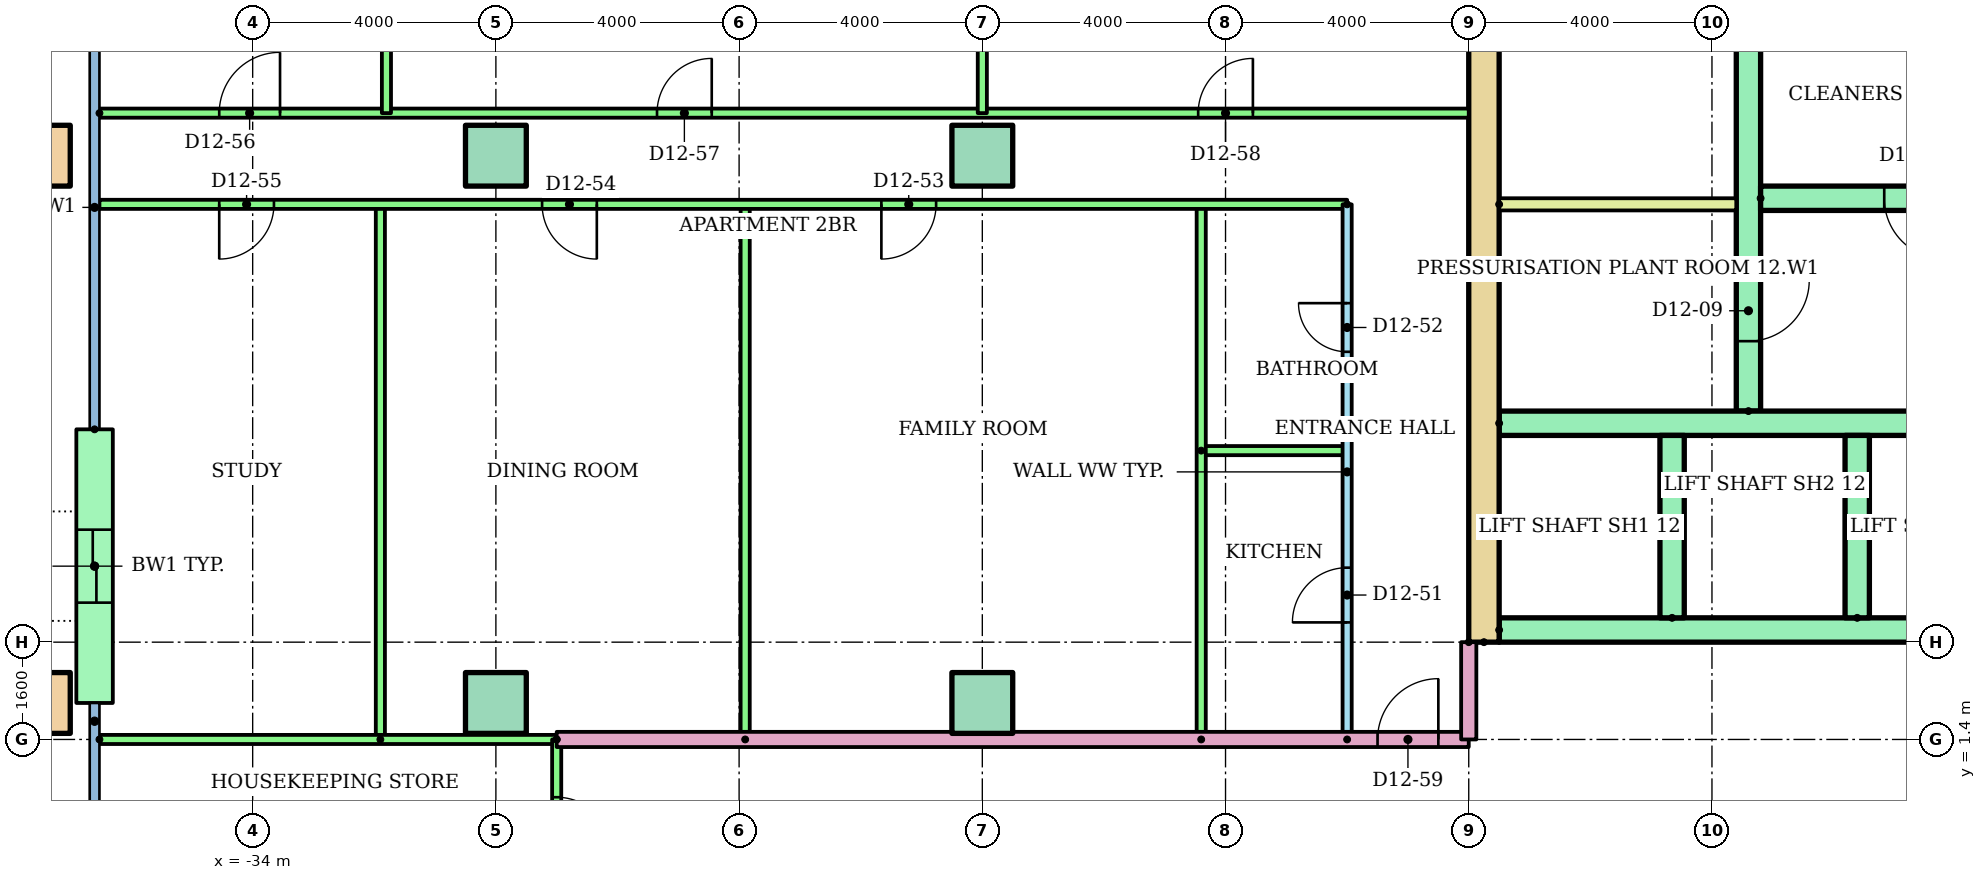
"""IFC4 building model, lengths in metres.
Left out: names, types, materials, properties, quantities, classifications, styles, units other than length and angle.
Written with IfcOpenShell. Run it as: python <this file> out.ifc"""

import sys

from ifc_helpers import new_model, si_unit, direction, frame, frame_2d, origin, origin_2d, place, context, subcontext, project, spatial, rectangle, hollow_rectangle, extrude, element, fill, save


model = new_model("IFC4")
c1 = context("Model", 3, precision=1e-05, world=origin(), true_north=direction((0.0, 1.0)))
c2 = subcontext(c1, "Body", "Model", "MODEL_VIEW")
j1 = project(units=[si_unit("LENGTHUNIT", "METRE"), si_unit("PLANEANGLEUNIT", "RADIAN")], contexts=[c1])
p1 = place(None, origin())
s1 = spatial("IfcSite", under=j1, at=p1, CompositionType="ELEMENT")
p2 = place(p1, origin())
s2 = spatial("IfcBuilding", under=s1, at=p2, CompositionType="ELEMENT")
p3 = place(p2, frame((0.0, 0.0, 48.0)))
s3 = spatial("IfcBuildingStorey", under=s2, at=p3, CompositionType="ELEMENT", Elevation=48.0)
p4 = place(p3, frame((-37.5, 2.0, 0.0)))
e1 = element("IfcColumn", 1, at=p4, inside=s3, PredefinedType="COLUMN", context=c2, shape_type="SweptSolid", body=[
    extrude(hollow_rectangle(XDim=1.0, YDim=1.0, WallThickness=0.05, at=origin_2d()), origin(), (0.0, 0.0, 1.0), 3.2),
])
for number, where in (
    (2, (-30.0, 2.0, 0.0)),
    (3, (-22.0, 2.0, 0.0)),
):
    element("IfcColumn", number, at=place(p3, frame(where)), inside=s3, PredefinedType="COLUMN", context=c2, shape_type="SweptSolid", body=[
        extrude(rectangle(XDim=1.0, YDim=1.0, at=origin_2d()), origin(), (0.0, 0.0, 1.0), 3.2),
    ])
p5 = place(p3, frame((-37.5, 11.0, 0.0)))
e4 = element("IfcColumn", 4, at=p5, inside=s3, PredefinedType="COLUMN", context=c2, shape_type="SweptSolid", body=[
    extrude(hollow_rectangle(XDim=1.0, YDim=1.0, WallThickness=0.05, at=origin_2d()), origin(), (0.0, 0.0, 1.0), 3.2),
])
for number, where in (
    (5, (-30.0, 11.0, 0.0)),
    (6, (-22.0, 11.0, 0.0)),
):
    element("IfcColumn", number, at=place(p3, frame(where)), inside=s3, PredefinedType="COLUMN", context=c2, shape_type="SweptSolid", body=[
        extrude(rectangle(XDim=1.0, YDim=1.0, at=origin_2d()), origin(), (0.0, 0.0, 1.0), 3.2),
    ])
p6 = place(p3, frame((-36.6, 6.5, 0.0), z_axis=(0.0, 0.0, 1.0), x_axis=(0.0, -1.0, 0.0)))
e7 = element("IfcWall", 7, at=p6, inside=s3, PredefinedType="STANDARD", context=c2, shape_type="SweptSolid", body=[
    extrude(rectangle(XDim=4.5, YDim=0.6, at=frame_2d((2.25, 0.0))), origin(), (0.0, 0.0, 1.0), 2.92),
])
p7 = place(p6, frame((1.65, 0.0, 0.0)))
e8 = element("IfcOpeningElement", 8, at=p7, cuts=e7, PredefinedType="OPENING", context=c2, shape_type="SweptSolid", body=[
    extrude(rectangle(XDim=1.2, YDim=2.1, at=frame_2d((0.6, 1.05))), frame((0.0, 0.31, 0.0), z_axis=(0.0, -1.0, 0.0), x_axis=(1.0, 0.0, 0.0)), (0.0, 0.0, 1.0), 0.62),
])
p8 = place(p3, frame((-13.75, 3.0, 0.0), z_axis=(0.0, 0.0, 1.0), x_axis=(0.0, 1.0, 0.0)))
e9 = element("IfcWall", 9, at=p8, inside=s3, PredefinedType="SHEAR", context=c2, shape_type="SweptSolid", body=[
    extrude(rectangle(XDim=17.0, YDim=0.5, at=frame_2d((8.5, 0.0))), origin(), (0.0, 0.0, 1.0), 2.92),
])
p9 = place(p3, frame((-9.4, 6.8, 0.0), z_axis=(0.0, 0.0, 1.0), x_axis=(0.0, 1.0, 0.0)))
e10 = element("IfcWall", 10, at=p9, inside=s3, PredefinedType="SHEAR", context=c2, shape_type="SweptSolid", body=[
    extrude(rectangle(XDim=12.7, YDim=0.4, at=frame_2d((6.35, 0.0))), origin(), (0.0, 0.0, 1.0), 2.92),
])
p10 = place(p9, frame((1.15, 0.0, 0.0)))
e11 = element("IfcOpeningElement", 11, at=p10, cuts=e10, PredefinedType="OPENING", context=c2, shape_type="SweptSolid", body=[
    extrude(rectangle(XDim=1.0, YDim=2.1, at=frame_2d((0.5, 1.05))), frame((0.0, 0.21, 0.0), z_axis=(0.0, -1.0, 0.0), x_axis=(1.0, 0.0, 0.0)), (0.0, 0.0, 1.0), 0.42),
])
p11 = place(p9, frame((7.925, 0.0, 0.0)))
e12 = element("IfcOpeningElement", 12, at=p11, cuts=e10, PredefinedType="OPENING", context=c2, shape_type="SweptSolid", body=[
    extrude(rectangle(XDim=1.0, YDim=2.1, at=frame_2d((0.5, 1.05))), frame((0.0, 0.21, 0.0), z_axis=(0.0, -1.0, 0.0), x_axis=(1.0, 0.0, 0.0)), (0.0, 0.0, 1.0), 0.42),
])
p12 = place(p3, frame((-13.5, 3.2, 0.0)))
e13 = element("IfcWall", 13, at=p12, inside=s3, PredefinedType="SHEAR", context=c2, shape_type="SweptSolid", body=[
    extrude(rectangle(XDim=27.0, YDim=0.4, at=frame_2d((13.5, 0.0))), origin(), (0.0, 0.0, 1.0), 2.92),
])
p13 = place(p12, frame((6.861, 0.0, 0.0)))
e14 = element("IfcOpeningElement", 14, at=p13, cuts=e13, PredefinedType="OPENING", context=c2, shape_type="SweptSolid", body=[
    extrude(rectangle(XDim=1.1, YDim=2.1, at=frame_2d((0.55, 1.05))), frame((0.0, 0.21, 0.0), z_axis=(0.0, -1.0, 0.0), x_axis=(1.0, 0.0, 0.0)), (0.0, 0.0, 1.0), 0.42),
])
p14 = place(p12, frame((9.906, 0.0, 0.0)))
e15 = element("IfcOpeningElement", 15, at=p14, cuts=e13, PredefinedType="OPENING", context=c2, shape_type="SweptSolid", body=[
    extrude(rectangle(XDim=1.1, YDim=2.1, at=frame_2d((0.55, 1.05))), frame((0.0, 0.21, 0.0), z_axis=(0.0, -1.0, 0.0), x_axis=(1.0, 0.0, 0.0)), (0.0, 0.0, 1.0), 0.42),
])
p15 = place(p12, frame((15.994, 0.0, 0.0)))
e16 = element("IfcOpeningElement", 16, at=p15, cuts=e13, PredefinedType="OPENING", context=c2, shape_type="SweptSolid", body=[
    extrude(rectangle(XDim=1.1, YDim=2.1, at=frame_2d((0.55, 1.05))), frame((0.0, 0.21, 0.0), z_axis=(0.0, -1.0, 0.0), x_axis=(1.0, 0.0, 0.0)), (0.0, 0.0, 1.0), 0.42),
])
p16 = place(p12, frame((19.039, 0.0, 0.0)))
e17 = element("IfcOpeningElement", 17, at=p16, cuts=e13, PredefinedType="OPENING", context=c2, shape_type="SweptSolid", body=[
    extrude(rectangle(XDim=1.1, YDim=2.1, at=frame_2d((0.55, 1.05))), frame((0.0, 0.21, 0.0), z_axis=(0.0, -1.0, 0.0), x_axis=(1.0, 0.0, 0.0)), (0.0, 0.0, 1.0), 0.42),
])
p17 = place(p12, frame((12.6, 0.0, 0.0)))
e18 = element("IfcOpeningElement", 18, at=p17, cuts=e13, PredefinedType="OPENING", context=c2, shape_type="SweptSolid", body=[
    extrude(rectangle(XDim=1.8, YDim=2.1, at=frame_2d((0.9, 1.05))), frame((0.0, 0.21, 0.0), z_axis=(0.0, -1.0, 0.0), x_axis=(1.0, 0.0, 0.0)), (0.0, 0.0, 1.0), 0.42),
])
p18 = place(p3, frame((-13.5, 6.6, 0.0)))
e19 = element("IfcWall", 19, at=p18, inside=s3, PredefinedType="SHEAR", context=c2, shape_type="SweptSolid", body=[
    extrude(rectangle(XDim=11.978, YDim=0.4, at=frame_2d((5.989, 0.0))), origin(), (0.0, 0.0, 1.0), 2.92),
])
for number, where, z_axis, x_axis in (
    (20, (-10.656, 3.4, 0.0), (0.0, 0.0, 1.0), (0.0, 1.0, 0.0)),
    (21, (-7.611, 3.4, 0.0), (0.0, 0.0, 1.0), (0.0, 1.0, 0.0)),
):
    element("IfcWall", number, at=place(p3, frame(where, z_axis=z_axis, x_axis=x_axis)), inside=s3, PredefinedType="SHEAR", context=c2, shape_type="SweptSolid", body=[
        extrude(rectangle(XDim=3.0, YDim=0.4, at=frame_2d((1.5, 0.0))), origin(), (0.0, 0.0, 1.0), 2.92),
    ])
p19 = place(p3, frame((-9.2, 10.3, 0.0)))
e22 = element("IfcWall", 22, at=p19, inside=s3, PredefinedType="SHEAR", context=c2, shape_type="SweptSolid", body=[
    extrude(rectangle(XDim=8.0, YDim=0.4, at=frame_2d((4.0, 0.0))), origin(), (0.0, 0.0, 1.0), 2.92),
])
p20 = place(p19, frame((2.033, 0.0, 0.0)))
e23 = element("IfcOpeningElement", 23, at=p20, cuts=e22, PredefinedType="OPENING", context=c2, shape_type="SweptSolid", body=[
    extrude(rectangle(XDim=1.0, YDim=2.1, at=frame_2d((0.5, 1.05))), frame((0.0, 0.21, 0.0), z_axis=(0.0, -1.0, 0.0), x_axis=(1.0, 0.0, 0.0)), (0.0, 0.0, 1.0), 0.42),
])
p21 = place(p19, frame((6.133, 0.0, 0.0)))
e24 = element("IfcOpeningElement", 24, at=p21, cuts=e22, PredefinedType="OPENING", context=c2, shape_type="SweptSolid", body=[
    extrude(rectangle(XDim=1.0, YDim=2.1, at=frame_2d((0.5, 1.05))), frame((0.0, 0.21, 0.0), z_axis=(0.0, -1.0, 0.0), x_axis=(1.0, 0.0, 0.0)), (0.0, 0.0, 1.0), 0.42),
])
p22 = place(p3, frame((-13.5, 10.2, 0.0)))
e25 = element("IfcWall", 25, at=p22, inside=s3, PredefinedType="PARTITIONING", context=c2, shape_type="SweptSolid", body=[
    extrude(rectangle(XDim=3.9, YDim=0.2, at=frame_2d((1.95, 0.0))), origin(), (0.0, 0.0, 1.0), 2.92),
])
p23 = place(p3, frame((-16.0, 1.4, 0.0), z_axis=(0.0, 0.0, 1.0), x_axis=(0.0, 1.0, 0.0)))
e26 = element("IfcWall", 26, at=p23, inside=s3, PredefinedType="PARTITIONING", context=c2, shape_type="SweptSolid", body=[
    extrude(rectangle(XDim=8.8, YDim=0.15, at=frame_2d((4.4, 0.0))), origin(), (0.0, 0.0, 1.0), 2.4),
])
p24 = place(p23, frame((1.925, 0.0, 0.0)))
e27 = element("IfcOpeningElement", 27, at=p24, cuts=e26, PredefinedType="OPENING", context=c2, shape_type="SweptSolid", body=[
    extrude(rectangle(XDim=0.9, YDim=2.1, at=frame_2d((0.45, 1.05))), frame((0.0, 0.085, 0.0), z_axis=(0.0, -1.0, 0.0), x_axis=(1.0, 0.0, 0.0)), (0.0, 0.0, 1.0), 0.17),
])
p25 = place(p23, frame((6.375, 0.0, 0.0)))
e28 = element("IfcOpeningElement", 28, at=p25, cuts=e26, PredefinedType="OPENING", context=c2, shape_type="SweptSolid", body=[
    extrude(rectangle(XDim=0.8, YDim=2.1, at=frame_2d((0.4, 1.05))), frame((0.0, 0.085, 0.0), z_axis=(0.0, -1.0, 0.0), x_axis=(1.0, 0.0, 0.0)), (0.0, 0.0, 1.0), 0.17),
])
p26 = place(p3, frame((-18.4, 6.15, 0.0)))
e29 = element("IfcWall", 29, at=p26, inside=s3, PredefinedType="PARTITIONING", context=c2, shape_type="SweptSolid", body=[
    extrude(rectangle(XDim=2.4, YDim=0.15, at=frame_2d((1.2, 0.0))), origin(), (0.0, 0.0, 1.0), 2.4),
])
for number, where, z_axis, x_axis in (
    (30, (-18.4, 1.4, 0.0), (0.0, 0.0, 1.0), (0.0, 1.0, 0.0)),
    (31, (-25.9, 1.4, 0.0), (0.0, 0.0, 1.0), (0.0, 1.0, 0.0)),
    (32, (-31.9, 1.4, 0.0), (0.0, 0.0, 1.0), (0.0, 1.0, 0.0)),
):
    element("IfcWall", number, at=place(p3, frame(where, z_axis=z_axis, x_axis=x_axis)), inside=s3, PredefinedType="PARTITIONING", context=c2, shape_type="SweptSolid", body=[
        extrude(rectangle(XDim=8.8, YDim=0.15, at=frame_2d((4.4, 0.0))), origin(), (0.0, 0.0, 1.0), 2.4),
    ])
p27 = place(p3, frame((-16.0, 10.2, 0.0), z_axis=(0.0, 0.0, 1.0), x_axis=(-1.0, 0.0, 0.0)))
e33 = element("IfcWall", 33, at=p27, inside=s3, PredefinedType="PARTITIONING", context=c2, shape_type="SweptSolid", body=[
    extrude(rectangle(XDim=20.52, YDim=0.15, at=frame_2d((10.26, 0.0))), origin(), (0.0, 0.0, 1.0), 2.4),
])
p28 = place(p27, frame((6.76, 0.0, 0.0)))
e34 = element("IfcOpeningElement", 34, at=p28, cuts=e33, PredefinedType="OPENING", context=c2, shape_type="SweptSolid", body=[
    extrude(rectangle(XDim=0.9, YDim=2.1, at=frame_2d((0.45, 1.05))), frame((0.0, 0.085, 0.0), z_axis=(0.0, -1.0, 0.0), x_axis=(1.0, 0.0, 0.0)), (0.0, 0.0, 1.0), 0.17),
])
p29 = place(p27, frame((12.34, 0.0, 0.0)))
e35 = element("IfcOpeningElement", 35, at=p29, cuts=e33, PredefinedType="OPENING", context=c2, shape_type="SweptSolid", body=[
    extrude(rectangle(XDim=0.9, YDim=2.1, at=frame_2d((0.45, 1.05))), frame((0.0, 0.085, 0.0), z_axis=(0.0, -1.0, 0.0), x_axis=(1.0, 0.0, 0.0)), (0.0, 0.0, 1.0), 0.17),
])
p30 = place(p27, frame((17.65, 0.0, 0.0)))
e36 = element("IfcOpeningElement", 36, at=p30, cuts=e33, PredefinedType="OPENING", context=c2, shape_type="SweptSolid", body=[
    extrude(rectangle(XDim=0.9, YDim=2.1, at=frame_2d((0.45, 1.05))), frame((0.0, 0.085, 0.0), z_axis=(0.0, -1.0, 0.0), x_axis=(1.0, 0.0, 0.0)), (0.0, 0.0, 1.0), 0.17),
])
p31 = place(p3, frame((-36.52, 11.7, 0.0)))
e37 = element("IfcWall", 37, at=p31, inside=s3, PredefinedType="PARTITIONING", context=c2, shape_type="SweptSolid", body=[
    extrude(rectangle(XDim=22.52, YDim=0.15, at=frame_2d((11.26, 0.0))), origin(), (0.0, 0.0, 1.0), 2.4),
])
p32 = place(p31, frame((1.97, 0.0, 0.0)))
e38 = element("IfcOpeningElement", 38, at=p32, cuts=e37, PredefinedType="OPENING", context=c2, shape_type="SweptSolid", body=[
    extrude(rectangle(XDim=1.0, YDim=2.1, at=frame_2d((0.5, 1.05))), frame((0.0, 0.085, 0.0), z_axis=(0.0, -1.0, 0.0), x_axis=(1.0, 0.0, 0.0)), (0.0, 0.0, 1.0), 0.17),
])
p33 = place(p31, frame((9.17, 0.0, 0.0)))
e39 = element("IfcOpeningElement", 39, at=p33, cuts=e37, PredefinedType="OPENING", context=c2, shape_type="SweptSolid", body=[
    extrude(rectangle(XDim=0.9, YDim=2.1, at=frame_2d((0.45, 1.05))), frame((0.0, 0.085, 0.0), z_axis=(0.0, -1.0, 0.0), x_axis=(1.0, 0.0, 0.0)), (0.0, 0.0, 1.0), 0.17),
])
p34 = place(p31, frame((18.07, 0.0, 0.0)))
e40 = element("IfcOpeningElement", 40, at=p34, cuts=e37, PredefinedType="OPENING", context=c2, shape_type="SweptSolid", body=[
    extrude(rectangle(XDim=0.9, YDim=2.1, at=frame_2d((0.45, 1.05))), frame((0.0, 0.085, 0.0), z_axis=(0.0, -1.0, 0.0), x_axis=(1.0, 0.0, 0.0)), (0.0, 0.0, 1.0), 0.17),
])
p35 = place(p3, frame((-31.8, 16.72, 0.0), z_axis=(0.0, 0.0, 1.0), x_axis=(0.0, -1.0, 0.0)))
e41 = element("IfcWall", 41, at=p35, inside=s3, PredefinedType="PARTITIONING", context=c2, shape_type="SweptSolid", body=[
    extrude(rectangle(XDim=5.02, YDim=0.15, at=frame_2d((2.51, 0.0))), origin(), (0.0, 0.0, 1.0), 2.4),
])
p36 = place(p3, frame((-22.0, 18.521, 0.0), z_axis=(0.0, 0.0, 1.0), x_axis=(0.0, -1.0, 0.0)))
e42 = element("IfcWall", 42, at=p36, inside=s3, PredefinedType="PARTITIONING", context=c2, shape_type="SweptSolid", body=[
    extrude(rectangle(XDim=6.821, YDim=0.15, at=frame_2d((3.411, 0.0))), origin(), (0.0, 0.0, 1.0), 2.4),
])
p37 = place(p3, frame((-29.0, 1.4, 0.0)))
e43 = element("IfcWall", 43, at=p37, inside=s3, PredefinedType="PARTITIONING", context=c2, shape_type="SweptSolid", body=[
    extrude(rectangle(XDim=15.0, YDim=0.25, at=frame_2d((7.5, 0.0))), origin(), (0.0, 0.0, 1.0), 2.4),
])
p38 = place(p37, frame((13.5, 0.0, 0.0)))
e44 = element("IfcOpeningElement", 44, at=p38, cuts=e43, PredefinedType="OPENING", context=c2, shape_type="SweptSolid", body=[
    extrude(rectangle(XDim=1.0, YDim=2.1, at=frame_2d((0.5, 1.05))), frame((0.0, 0.135, 0.0), z_axis=(0.0, -1.0, 0.0), x_axis=(1.0, 0.0, 0.0)), (0.0, 0.0, 1.0), 0.27),
])
p39 = place(p3, frame((-36.52, 1.4, 0.0)))
e45 = element("IfcWall", 45, at=p39, inside=s3, PredefinedType="PARTITIONING", context=c2, shape_type="SweptSolid", body=[
    extrude(rectangle(XDim=7.52, YDim=0.15, at=frame_2d((3.76, 0.0))), origin(), (0.0, 0.0, 1.0), 2.4),
])
p40 = place(p3, frame((-29.0, 1.4, 0.0), z_axis=(0.0, 0.0, 1.0), x_axis=(0.0, -1.0, 0.0)))
e46 = element("IfcWall", 46, at=p40, inside=s3, PredefinedType="PARTITIONING", context=c2, shape_type="SweptSolid", body=[
    extrude(rectangle(XDim=2.8, YDim=0.15, at=frame_2d((1.4, 0.0))), origin(), (0.0, 0.0, 1.0), 2.4),
])
p41 = place(p40, frame((0.95, 0.0, 0.0)))
e47 = element("IfcOpeningElement", 47, at=p41, cuts=e46, PredefinedType="OPENING", context=c2, shape_type="SweptSolid", body=[
    extrude(rectangle(XDim=0.9, YDim=2.1, at=frame_2d((0.45, 1.05))), frame((0.0, 0.085, 0.0), z_axis=(0.0, -1.0, 0.0), x_axis=(1.0, 0.0, 0.0)), (0.0, 0.0, 1.0), 0.17),
])
p42 = place(p3, frame((-14.0, 3.0, 0.0), z_axis=(0.0, 0.0, 1.0), x_axis=(0.0, -1.0, 0.0)))
e48 = element("IfcWall", 48, at=p42, inside=s3, PredefinedType="PARTITIONING", context=c2, shape_type="SweptSolid", body=[
    extrude(rectangle(XDim=1.6, YDim=0.25, at=frame_2d((0.8, 0.0))), origin(), (0.0, 0.0, 1.0), 2.4),
])
p43 = place(p20, frame((1.0, 0.0, 0.0), z_axis=(0.0, 0.0, 1.0), x_axis=(-1.0, 0.0, 0.0)))
e49 = element("IfcDoor", 49, at=p43, inside=s3, OperationType="SINGLE_SWING_RIGHT", PredefinedType="DOOR", context=c2, shape_type="SweptSolid", body=[
    extrude(rectangle(XDim=1.0, YDim=2.1, at=frame_2d((0.5, 1.05))), frame((0.0, 0.025, 0.0), z_axis=(0.0, -1.0, 0.0), x_axis=(1.0, 0.0, 0.0)), (0.0, 0.0, 1.0), 0.05),
])
fill(e23, e49)
p44 = place(p10, frame((1.0, 0.0, 0.0), z_axis=(0.0, 0.0, 1.0), x_axis=(-1.0, 0.0, 0.0)))
e50 = element("IfcDoor", 50, at=p44, inside=s3, OperationType="SINGLE_SWING_RIGHT", PredefinedType="DOOR", context=c2, shape_type="SweptSolid", body=[
    extrude(rectangle(XDim=1.0, YDim=2.1, at=frame_2d((0.5, 1.05))), frame((0.0, 0.025, 0.0), z_axis=(0.0, -1.0, 0.0), x_axis=(1.0, 0.0, 0.0)), (0.0, 0.0, 1.0), 0.05),
])
fill(e11, e50)
p45 = place(p24, origin())
e51 = element("IfcDoor", 51, at=p45, inside=s3, OperationType="SINGLE_SWING_LEFT", PredefinedType="DOOR", context=c2, shape_type="SweptSolid", body=[
    extrude(rectangle(XDim=0.9, YDim=2.1, at=frame_2d((0.45, 1.05))), frame((0.0, 0.025, 0.0), z_axis=(0.0, -1.0, 0.0), x_axis=(1.0, 0.0, 0.0)), (0.0, 0.0, 1.0), 0.05),
])
fill(e27, e51)
p46 = place(p25, origin())
e52 = element("IfcDoor", 52, at=p46, inside=s3, OperationType="SINGLE_SWING_RIGHT", PredefinedType="DOOR", context=c2, shape_type="SweptSolid", body=[
    extrude(rectangle(XDim=0.8, YDim=2.1, at=frame_2d((0.4, 1.05))), frame((0.0, 0.025, 0.0), z_axis=(0.0, -1.0, 0.0), x_axis=(1.0, 0.0, 0.0)), (0.0, 0.0, 1.0), 0.05),
])
fill(e28, e52)
p47 = place(p28, origin())
e53 = element("IfcDoor", 53, at=p47, inside=s3, OperationType="SINGLE_SWING_RIGHT", PredefinedType="DOOR", context=c2, shape_type="SweptSolid", body=[
    extrude(rectangle(XDim=0.9, YDim=2.1, at=frame_2d((0.45, 1.05))), frame((0.0, 0.025, 0.0), z_axis=(0.0, -1.0, 0.0), x_axis=(1.0, 0.0, 0.0)), (0.0, 0.0, 1.0), 0.05),
])
fill(e34, e53)
p48 = place(p29, origin())
e54 = element("IfcDoor", 54, at=p48, inside=s3, OperationType="SINGLE_SWING_LEFT", PredefinedType="DOOR", context=c2, shape_type="SweptSolid", body=[
    extrude(rectangle(XDim=0.9, YDim=2.1, at=frame_2d((0.45, 1.05))), frame((0.0, 0.025, 0.0), z_axis=(0.0, -1.0, 0.0), x_axis=(1.0, 0.0, 0.0)), (0.0, 0.0, 1.0), 0.05),
])
fill(e35, e54)
p49 = place(p30, origin())
e55 = element("IfcDoor", 55, at=p49, inside=s3, OperationType="SINGLE_SWING_RIGHT", PredefinedType="DOOR", context=c2, shape_type="SweptSolid", body=[
    extrude(rectangle(XDim=0.9, YDim=2.1, at=frame_2d((0.45, 1.05))), frame((0.0, 0.025, 0.0), z_axis=(0.0, -1.0, 0.0), x_axis=(1.0, 0.0, 0.0)), (0.0, 0.0, 1.0), 0.05),
])
fill(e36, e55)
p50 = place(p32, origin())
e56 = element("IfcDoor", 56, at=p50, inside=s3, OperationType="SINGLE_SWING_RIGHT", PredefinedType="DOOR", context=c2, shape_type="SweptSolid", body=[
    extrude(rectangle(XDim=1.0, YDim=2.1, at=frame_2d((0.5, 1.05))), frame((0.0, 0.025, 0.0), z_axis=(0.0, -1.0, 0.0), x_axis=(1.0, 0.0, 0.0)), (0.0, 0.0, 1.0), 0.05),
])
fill(e38, e56)
p51 = place(p33, origin())
e57 = element("IfcDoor", 57, at=p51, inside=s3, OperationType="SINGLE_SWING_RIGHT", PredefinedType="DOOR", context=c2, shape_type="SweptSolid", body=[
    extrude(rectangle(XDim=0.9, YDim=2.1, at=frame_2d((0.45, 1.05))), frame((0.0, 0.025, 0.0), z_axis=(0.0, -1.0, 0.0), x_axis=(1.0, 0.0, 0.0)), (0.0, 0.0, 1.0), 0.05),
])
fill(e39, e57)
p52 = place(p34, origin())
e58 = element("IfcDoor", 58, at=p52, inside=s3, OperationType="SINGLE_SWING_RIGHT", PredefinedType="DOOR", context=c2, shape_type="SweptSolid", body=[
    extrude(rectangle(XDim=0.9, YDim=2.1, at=frame_2d((0.45, 1.05))), frame((0.0, 0.025, 0.0), z_axis=(0.0, -1.0, 0.0), x_axis=(1.0, 0.0, 0.0)), (0.0, 0.0, 1.0), 0.05),
])
fill(e40, e58)
p53 = place(p38, origin())
e59 = element("IfcDoor", 59, at=p53, inside=s3, OperationType="SINGLE_SWING_RIGHT", PredefinedType="DOOR", context=c2, shape_type="SweptSolid", body=[
    extrude(rectangle(XDim=1.0, YDim=2.1, at=frame_2d((0.5, 1.05))), frame((0.0, 0.025, 0.0), z_axis=(0.0, -1.0, 0.0), x_axis=(1.0, 0.0, 0.0)), (0.0, 0.0, 1.0), 0.05),
])
fill(e44, e59)
p54 = place(p41, origin())
e60 = element("IfcDoor", 60, at=p54, inside=s3, OperationType="SINGLE_SWING_RIGHT", PredefinedType="DOOR", context=c2, shape_type="SweptSolid", body=[
    extrude(rectangle(XDim=0.9, YDim=2.1, at=frame_2d((0.45, 1.05))), frame((0.0, 0.025, 0.0), z_axis=(0.0, -1.0, 0.0), x_axis=(1.0, 0.0, 0.0)), (0.0, 0.0, 1.0), 0.05),
])
fill(e47, e60)
p55 = place(p7, origin())
e61 = element("IfcDoor", 61, at=p55, inside=s3, OperationType="SLIDING_TO_LEFT", PredefinedType="DOOR", context=c2, shape_type="SweptSolid", body=[
    extrude(rectangle(XDim=1.2, YDim=2.1, at=frame_2d((0.6, 1.05))), frame((0.0, 0.025, 0.0), z_axis=(0.0, -1.0, 0.0), x_axis=(1.0, 0.0, 0.0)), (0.0, 0.0, 1.0), 0.05),
])
fill(e8, e61)
save(model, sys.argv[1])
